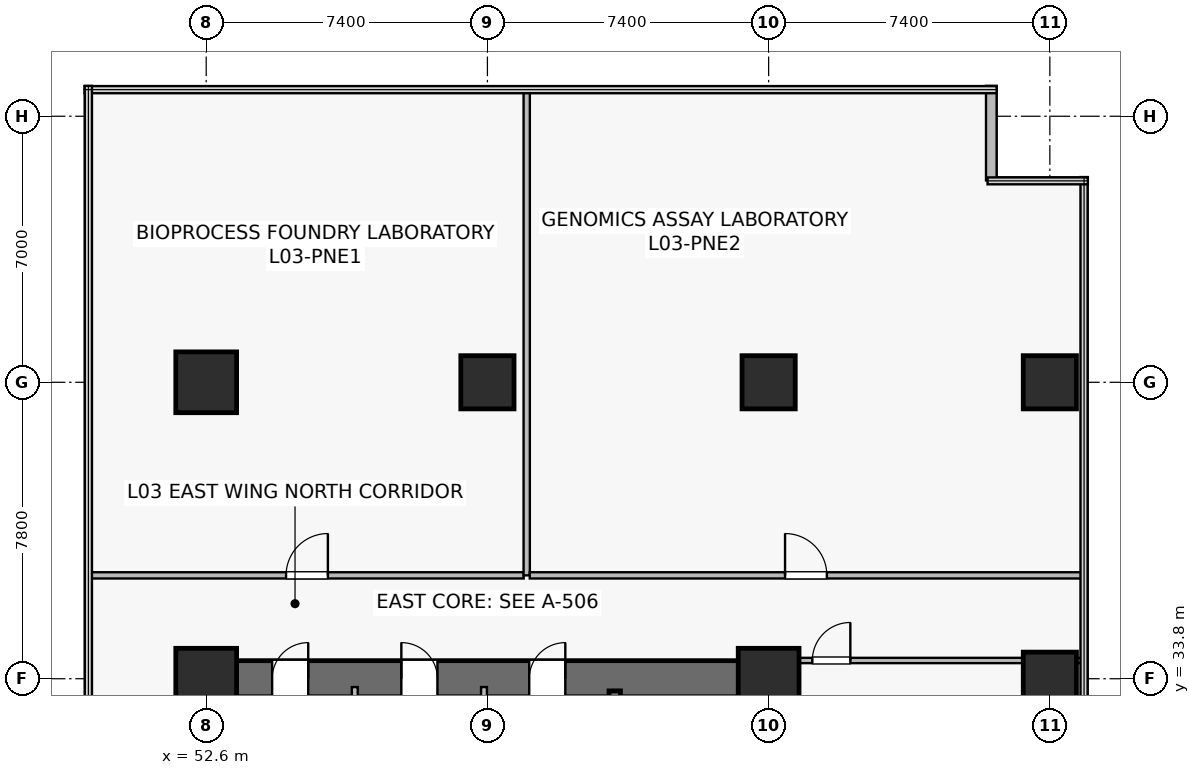
"""IFC4 building model, lengths in metres.
Left out: names, types, materials, properties, quantities, classifications, styles, units other than length and angle.
Written with IfcOpenShell. Run it as: python <this file> out.ifc"""

import sys

from ifc_helpers import new_model, si_unit, direction, frame, frame_2d, origin, origin_2d, place, context, subcontext, project, spatial, rectangle, extrude, source, transform, mapped, element, fill, save


model = new_model("IFC4")
c1 = context("Model", 3, precision=1e-05, world=origin(), true_north=direction((0.0, 1.0)))
c2 = subcontext(c1, "Body", "Model", "MODEL_VIEW")
j1 = project(units=[si_unit("LENGTHUNIT", "METRE"), si_unit("PLANEANGLEUNIT", "RADIAN")], contexts=[c1])
p1 = place(None, origin())
s1 = spatial("IfcSite", under=j1, at=p1, CompositionType="ELEMENT")
p2 = place(p1, origin())
s2 = spatial("IfcBuilding", under=s1, at=p2, CompositionType="ELEMENT")
p3 = place(p2, frame((0.0, 0.0, 10.2)))
s3 = spatial("IfcBuildingStorey", under=s2, at=p3, CompositionType="ELEMENT", Elevation=10.2)
p4 = place(p3, frame((52.125, 33.8, 0.0), z_axis=(0.0, 0.0, 1.0), x_axis=(1.0, 0.0, 0.0)))
e1 = element("IfcWall", 1, at=p4, inside=s3, PredefinedType="SHEAR", context=c2, shape_type="SweptSolid", body=[
    extrude(rectangle(XDim=15.75, YDim=0.95, at=frame_2d((7.875, 0.0))), origin(), (0.0, 0.0, 1.0), 4.45),
])
p5 = place(p4, frame((8.975, 0.0, 0.0)))
e2 = element("IfcOpeningElement", 2, at=p5, cuts=e1, PredefinedType="OPENING", context=c2, shape_type="SweptSolid", body=[
    extrude(rectangle(XDim=0.95, YDim=2.15, at=frame_2d((0.475, 1.075))), frame((0.0, 0.485, 0.0), z_axis=(0.0, -1.0, 0.0), x_axis=(1.0, 0.0, 0.0)), (0.0, 0.0, 1.0), 0.97),
])
p6 = place(p4, frame((5.61, 0.0, 0.0)))
e3 = element("IfcOpeningElement", 3, at=p6, cuts=e1, PredefinedType="OPENING", context=c2, shape_type="SweptSolid", body=[
    extrude(rectangle(XDim=0.95, YDim=2.15, at=frame_2d((0.475, 1.075))), frame((0.0, 0.485, 0.0), z_axis=(0.0, -1.0, 0.0), x_axis=(1.0, 0.0, 0.0)), (0.0, 0.0, 1.0), 0.97),
])
p7 = place(p4, frame((2.21, 0.0, 0.0)))
e4 = element("IfcOpeningElement", 4, at=p7, cuts=e1, PredefinedType="OPENING", context=c2, shape_type="SweptSolid", body=[
    extrude(rectangle(XDim=0.95, YDim=2.15, at=frame_2d((0.475, 1.075))), frame((0.0, 0.485, 0.0), z_axis=(0.0, -1.0, 0.0), x_axis=(1.0, 0.0, 0.0)), (0.0, 0.0, 1.0), 0.97),
])
p8 = place(p3, frame((63.35, 24.85, 0.0), z_axis=(0.0, 0.0, 1.0), x_axis=(0.0, 1.0, 0.0)))
e5 = element("IfcWall", 5, at=p8, inside=s3, PredefinedType="SHEAR", context=c2, shape_type="SweptSolid", body=[
    extrude(rectangle(XDim=8.63, YDim=0.3, at=frame_2d((4.315, 0.0))), origin(), (0.0, 0.0, 1.0), 4.45),
])
p9 = place(p8, frame((0.42, 0.0, 0.0)))
e6 = element("IfcOpeningElement", 6, at=p9, cuts=e5, PredefinedType="OPENING", context=c2, shape_type="SweptSolid", body=[
    extrude(rectangle(XDim=1.1, YDim=2.15, at=frame_2d((0.55, 1.075))), frame((0.0, 0.16, 0.0), z_axis=(0.0, -1.0, 0.0), x_axis=(1.0, 0.0, 0.0)), (0.0, 0.0, 1.0), 0.32),
])
m1 = source(origin(), c2, "Body", "SweptSolid", [
    extrude(rectangle(XDim=1.6, YDim=1.6, at=origin_2d()), origin(), (0.0, 0.0, 1.0), 4.8),
])
for number, where, z_axis, x_axis in (
    (7, (52.6, 33.8, 0.0), (0.0, 0.0, 1.0), (1.0, 0.0, 0.0)),
    (8, (67.4, 33.8, 0.0), (0.0, 0.0, 1.0), (1.0, 0.0, 0.0)),
    (9, (52.6, 41.6, 0.0), (0.0, 0.0, 1.0), (1.0, 0.0, 0.0)),
):
    element("IfcColumn", number, at=place(p3, frame(where, z_axis=z_axis, x_axis=x_axis)), inside=s3, PredefinedType="COLUMN", context=c2, shape_type="MappedRepresentation", body=[
        mapped(m1, transform((0.0, 0.0, 0.0), scale=1.0)),
    ])
m2 = source(origin(), c2, "Body", "SweptSolid", [
    extrude(rectangle(XDim=1.4, YDim=1.4, at=origin_2d()), origin(), (0.0, 0.0, 1.0), 4.8),
])
for number, where, z_axis, x_axis in (
    (10, (60.0, 41.6, 0.0), (0.0, 0.0, 1.0), (1.0, 0.0, 0.0)),
    (11, (67.4, 41.6, 0.0), (0.0, 0.0, 1.0), (1.0, 0.0, 0.0)),
    (12, (74.8, 33.8, 0.0), (0.0, 0.0, 1.0), (1.0, 0.0, 0.0)),
    (13, (74.8, 41.6, 0.0), (0.0, 0.0, 1.0), (1.0, 0.0, 0.0)),
):
    element("IfcColumn", number, at=place(p3, frame(where, z_axis=z_axis, x_axis=x_axis)), inside=s3, PredefinedType="COLUMN", context=c2, shape_type="MappedRepresentation", body=[
        mapped(m2, transform((0.0, 0.0, 0.0), scale=1.0)),
    ])
p10 = place(p3, frame((73.26, 46.912, 0.0), z_axis=(0.0, 0.0, 1.0), x_axis=(0.0, 1.0, 0.0)))
e14 = element("IfcWall", 14, at=p10, inside=s3, PredefinedType="STANDARD", context=c2, shape_type="SweptSolid", body=[
    extrude(rectangle(XDim=2.488, YDim=0.28, at=frame_2d((1.244, 0.0))), origin(), (0.0, 0.0, 1.0), 4.45),
])
p11 = place(p3, frame((59.91, 29.65, 0.0), z_axis=(0.0, 0.0, 1.0), x_axis=(0.0, 1.0, 0.0)))
e15 = element("IfcWall", 15, at=p11, inside=s3, PredefinedType="PLUMBINGWALL", context=c2, shape_type="SweptSolid", body=[
    extrude(rectangle(XDim=3.93, YDim=0.155, at=frame_2d((1.965, 0.0))), origin(), (0.0, 0.0, 1.0), 3.735),
])
p12 = place(p3, frame((56.51, 29.65, 0.0), z_axis=(0.0, 0.0, 1.0), x_axis=(0.0, 1.0, 0.0)))
e16 = element("IfcWall", 16, at=p12, inside=s3, PredefinedType="PLUMBINGWALL", context=c2, shape_type="SweptSolid", body=[
    extrude(rectangle(XDim=3.93, YDim=0.155, at=frame_2d((1.965, 0.0))), origin(), (0.0, 0.0, 1.0), 4.45),
])
p13 = place(p3, frame((68.0, 34.28, 0.0), z_axis=(0.0, 0.0, 1.0), x_axis=(1.0, 0.0, 0.0)))
e17 = element("IfcWall", 17, at=p13, inside=s3, PredefinedType="PARTITIONING", context=c2, shape_type="SweptSolid", body=[
    extrude(rectangle(XDim=7.65, YDim=0.14, at=frame_2d((3.825, 0.0))), origin(), (0.0, 0.0, 1.0), 3.835),
])
p14 = place(p13, frame((0.55, 0.0, 0.0)))
e18 = element("IfcOpeningElement", 18, at=p14, cuts=e17, PredefinedType="OPENING", context=c2, shape_type="SweptSolid", body=[
    extrude(rectangle(XDim=1.0, YDim=2.15, at=frame_2d((0.5, 1.075))), frame((0.0, 0.08, 0.0), z_axis=(0.0, -1.0, 0.0), x_axis=(1.0, 0.0, 0.0)), (0.0, 0.0, 1.0), 0.16),
])
p15 = place(p3, frame((49.55, 36.52, 0.0), z_axis=(0.0, 0.0, 1.0), x_axis=(1.0, 0.0, 0.0)))
e19 = element("IfcWall", 19, at=p15, inside=s3, PredefinedType="PARTITIONING", context=c2, shape_type="SweptSolid", body=[
    extrude(rectangle(XDim=11.404, YDim=0.165, at=frame_2d((5.702, 0.0))), origin(), (0.0, 0.0, 1.0), 3.735),
])
p16 = place(p15, frame((5.152, 0.0, 0.0)))
e20 = element("IfcOpeningElement", 20, at=p16, cuts=e19, PredefinedType="OPENING", context=c2, shape_type="SweptSolid", body=[
    extrude(rectangle(XDim=1.1, YDim=2.18, at=frame_2d((0.55, 1.09))), frame((0.0, 0.093, 0.0), z_axis=(0.0, -1.0, 0.0), x_axis=(1.0, 0.0, 0.0)), (0.0, 0.0, 1.0), 0.185),
])
p17 = place(p3, frame((61.034, 36.52, 0.0), z_axis=(0.0, 0.0, 1.0), x_axis=(0.0, 1.0, 0.0)))
e21 = element("IfcWall", 21, at=p17, inside=s3, PredefinedType="PARTITIONING", context=c2, shape_type="SweptSolid", body=[
    extrude(rectangle(XDim=12.77, YDim=0.165, at=frame_2d((6.385, 0.0))), origin(), (0.0, 0.0, 1.0), 3.635),
])
p18 = place(p3, frame((61.114, 36.52, 0.0), z_axis=(0.0, 0.0, 1.0), x_axis=(1.0, 0.0, 0.0)))
e22 = element("IfcWall", 22, at=p18, inside=s3, PredefinedType="PARTITIONING", context=c2, shape_type="SweptSolid", body=[
    extrude(rectangle(XDim=14.536, YDim=0.165, at=frame_2d((7.268, 0.0))), origin(), (0.0, 0.0, 1.0), 3.735),
])
p19 = place(p18, frame((6.718, 0.0, 0.0)))
e23 = element("IfcOpeningElement", 23, at=p19, cuts=e22, PredefinedType="OPENING", context=c2, shape_type="SweptSolid", body=[
    extrude(rectangle(XDim=1.1, YDim=2.18, at=frame_2d((0.55, 1.09))), frame((0.0, 0.093, 0.0), z_axis=(0.0, -1.0, 0.0), x_axis=(1.0, 0.0, 0.0)), (0.0, 0.0, 1.0), 0.185),
])
m3 = source(origin(), c2, "Body", "SweptSolid", [
    extrude(rectangle(XDim=0.95, YDim=2.15, at=frame_2d((0.475, 1.075))), frame((0.0, 0.025, 0.0), z_axis=(0.0, -1.0, 0.0), x_axis=(1.0, 0.0, 0.0)), (0.0, 0.0, 1.0), 0.05),
])
p20 = place(p5, origin())
e24 = element("IfcDoor", 24, at=p20, inside=s3, OperationType="SINGLE_SWING_RIGHT", PredefinedType="DOOR", context=c2, shape_type="MappedRepresentation", body=[
    mapped(m3, transform((0.0, 0.0, 0.0), scale=1.0)),
])
fill(e2, e24)
p21 = place(p6, origin())
e25 = element("IfcDoor", 25, at=p21, inside=s3, OperationType="SINGLE_SWING_LEFT", PredefinedType="DOOR", context=c2, shape_type="MappedRepresentation", body=[
    mapped(m3, transform((0.0, 0.0, 0.0), scale=1.0)),
])
fill(e3, e25)
p22 = place(p7, origin())
e26 = element("IfcDoor", 26, at=p22, inside=s3, OperationType="SINGLE_SWING_RIGHT", PredefinedType="DOOR", context=c2, shape_type="MappedRepresentation", body=[
    mapped(m3, transform((0.0, 0.0, 0.0), scale=1.0)),
])
fill(e4, e26)
m4 = source(origin(), c2, "Body", "SweptSolid", [
    extrude(rectangle(XDim=1.0, YDim=2.15, at=frame_2d((0.5, 1.075))), frame((0.0, 0.025, 0.0), z_axis=(0.0, -1.0, 0.0), x_axis=(1.0, 0.0, 0.0)), (0.0, 0.0, 1.0), 0.05),
])
p23 = place(p14, origin())
e27 = element("IfcDoor", 27, at=p23, inside=s3, OperationType="SINGLE_SWING_RIGHT", PredefinedType="DOOR", context=c2, shape_type="MappedRepresentation", body=[
    mapped(m4, transform((0.0, 0.0, 0.0), scale=1.0)),
])
fill(e18, e27)
m5 = source(origin(), c2, "Body", "SweptSolid", [
    extrude(rectangle(XDim=1.1, YDim=2.18, at=frame_2d((0.55, 1.09))), frame((0.0, 0.025, 0.0), z_axis=(0.0, -1.0, 0.0), x_axis=(1.0, 0.0, 0.0)), (0.0, 0.0, 1.0), 0.05),
])
p24 = place(p16, origin())
e28 = element("IfcDoor", 28, at=p24, inside=s3, OperationType="SINGLE_SWING_RIGHT", PredefinedType="DOOR", context=c2, shape_type="MappedRepresentation", body=[
    mapped(m5, transform((0.0, 0.0, 0.0), scale=1.0)),
])
fill(e20, e28)
p25 = place(p19, origin())
e29 = element("IfcDoor", 29, at=p25, inside=s3, OperationType="SINGLE_SWING_LEFT", PredefinedType="DOOR", context=c2, shape_type="MappedRepresentation", body=[
    mapped(m5, transform((0.0, 0.0, 0.0), scale=1.0)),
])
fill(e23, e29)
save(model, sys.argv[1])
